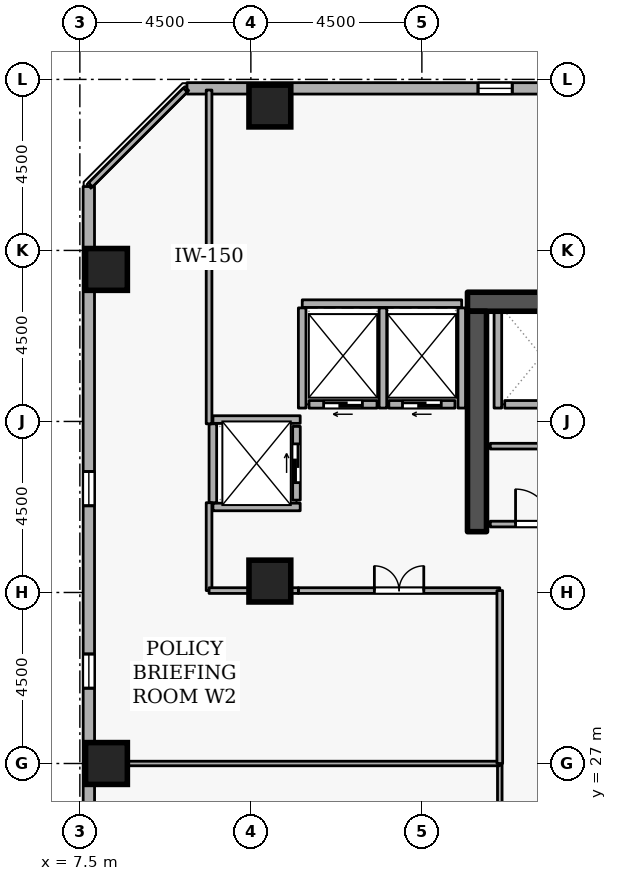
"""IFC4 building model, lengths in metres.
Left out: names, types, materials, properties, quantities, classifications, styles, units other than length and angle.
Written with IfcOpenShell. Run it as: python <this file> out.ifc"""

import sys

from ifc_helpers import new_model, si_unit, direction, frame, frame_2d, origin, origin_2d, place, context, subcontext, project, spatial, rectangle, extrude, element, fill, save


model = new_model("IFC4")
c1 = context("Model", 3, precision=1e-05, world=origin(), true_north=direction((0.0, 1.0)))
c2 = subcontext(c1, "Body", "Model", "MODEL_VIEW")
j1 = project(units=[si_unit("LENGTHUNIT", "METRE"), si_unit("PLANEANGLEUNIT", "RADIAN")], contexts=[c1])
p1 = place(None, origin())
s1 = spatial("IfcSite", under=j1, at=p1, CompositionType="ELEMENT")
p2 = place(p1, origin())
s2 = spatial("IfcBuilding", under=s1, at=p2, CompositionType="ELEMENT")
p3 = place(p2, frame((0.0, 0.0, 156.3)))
s3 = spatial("IfcBuildingStorey", under=s2, at=p3, CompositionType="ELEMENT", Elevation=156.3)
p4 = place(p3, frame((17.7, 39.15, 0.0), z_axis=(0.0, 0.0, 1.0), x_axis=(1.0, 0.0, 0.0)))
e1 = element("IfcWall", 1, at=p4, inside=s3, PredefinedType="SHEAR", context=c2, shape_type="SweptSolid", body=[
    extrude(rectangle(XDim=15.6, YDim=0.5, at=frame_2d((7.8, 0.0))), origin(), (0.0, 0.0, 1.0), 3.6),
])
p5 = place(p3, frame((17.95, 33.1, 0.0), z_axis=(0.0, 0.0, 1.0), x_axis=(0.0, 1.0, 0.0)))
e2 = element("IfcWall", 2, at=p5, inside=s3, PredefinedType="SHEAR", context=c2, shape_type="SweptSolid", body=[
    extrude(rectangle(XDim=5.8, YDim=0.5, at=frame_2d((2.9, 0.0))), origin(), (0.0, 0.0, 1.0), 3.6),
])
for number, where, z_axis, x_axis in (
    (3, (12.5, 44.3, 0.0), (0.0, 0.0, 1.0), (1.0, 0.0, 0.0)),
    (4, (8.2, 27.0, 0.0), (0.0, 0.0, 1.0), (1.0, 0.0, 0.0)),
    (5, (8.2, 40.0, 0.0), (0.0, 0.0, 1.0), (1.0, 0.0, 0.0)),
    (6, (12.5, 31.8, 0.0), (0.0, 0.0, 1.0), (1.0, 0.0, 0.0)),
):
    element("IfcColumn", number, at=place(p3, frame(where, z_axis=z_axis, x_axis=x_axis)), inside=s3, PredefinedType="COLUMN", context=c2, shape_type="SweptSolid", body=[
        extrude(rectangle(XDim=1.1, YDim=1.1, at=origin_2d()), origin(), (0.0, 0.0, 1.0), 3.6),
    ])
p6 = place(p3, frame((45.578, 44.761, 0.0), z_axis=(0.0, 0.0, 1.0), x_axis=(-0.999999994606, 0.000103863011, 0.0)))
e7 = element("IfcWall", 7, at=p6, inside=s3, PredefinedType="STANDARD", context=c2, shape_type="SweptSolid", body=[
    extrude(rectangle(XDim=35.259, YDim=0.3, at=frame_2d((17.629, 0.0))), origin(), (0.0, 0.0, 1.0), 2.7),
])
p7 = place(p6, frame((2.7, 0.0, 0.72)))
e8 = element("IfcOpeningElement", 8, at=p7, cuts=e7, PredefinedType="OPENING", context=c2, shape_type="SweptSolid", body=[
    extrude(rectangle(XDim=0.9, YDim=1.75, at=frame_2d((0.45, 0.875))), frame((0.0, 0.16, 0.0), z_axis=(0.0, -1.0, 0.0), x_axis=(1.0, 0.0, 0.0)), (0.0, 0.0, 1.0), 0.32),
])
p8 = place(p6, frame((12.3, 0.0, 0.72)))
e9 = element("IfcOpeningElement", 9, at=p8, cuts=e7, PredefinedType="OPENING", context=c2, shape_type="SweptSolid", body=[
    extrude(rectangle(XDim=0.9, YDim=1.75, at=frame_2d((0.45, 0.875))), frame((0.0, 0.16, 0.0), z_axis=(0.0, -1.0, 0.0), x_axis=(1.0, 0.0, 0.0)), (0.0, 0.0, 1.0), 0.32),
])
p9 = place(p6, frame((17.1, 0.0, 0.72)))
e10 = element("IfcOpeningElement", 10, at=p9, cuts=e7, PredefinedType="OPENING", context=c2, shape_type="SweptSolid", body=[
    extrude(rectangle(XDim=0.9, YDim=1.75, at=frame_2d((0.45, 0.875))), frame((0.0, 0.16, 0.0), z_axis=(0.0, -1.0, 0.0), x_axis=(1.0, 0.0, 0.0)), (0.0, 0.0, 1.0), 0.32),
])
p10 = place(p6, frame((21.9, 0.0, 0.72)))
e11 = element("IfcOpeningElement", 11, at=p10, cuts=e7, PredefinedType="OPENING", context=c2, shape_type="SweptSolid", body=[
    extrude(rectangle(XDim=0.9, YDim=1.75, at=frame_2d((0.45, 0.875))), frame((0.0, 0.16, 0.0), z_axis=(0.0, -1.0, 0.0), x_axis=(1.0, 0.0, 0.0)), (0.0, 0.0, 1.0), 0.32),
])
p11 = place(p6, frame((26.7, 0.0, 0.72)))
e12 = element("IfcOpeningElement", 12, at=p11, cuts=e7, PredefinedType="OPENING", context=c2, shape_type="SweptSolid", body=[
    extrude(rectangle(XDim=0.9, YDim=1.75, at=frame_2d((0.45, 0.875))), frame((0.0, 0.16, 0.0), z_axis=(0.0, -1.0, 0.0), x_axis=(1.0, 0.0, 0.0)), (0.0, 0.0, 1.0), 0.32),
])
p12 = place(p3, frame((7.735, 42.181, 0.0), z_axis=(0.0, 0.0, 1.0), x_axis=(0.000103863011, -0.999999994606, 0.0)))
e13 = element("IfcWall", 13, at=p12, inside=s3, PredefinedType="STANDARD", context=c2, shape_type="SweptSolid", body=[
    extrude(rectangle(XDim=35.259, YDim=0.3, at=frame_2d((17.629, 0.0))), origin(), (0.0, 0.0, 1.0), 2.7),
])
p13 = place(p12, frame((7.5, 0.0, 0.72)))
e14 = element("IfcOpeningElement", 14, at=p13, cuts=e13, PredefinedType="OPENING", context=c2, shape_type="SweptSolid", body=[
    extrude(rectangle(XDim=0.9, YDim=1.75, at=frame_2d((0.45, 0.875))), frame((0.0, 0.16, 0.0), z_axis=(0.0, -1.0, 0.0), x_axis=(1.0, 0.0, 0.0)), (0.0, 0.0, 1.0), 0.32),
])
p14 = place(p12, frame((12.3, 0.0, 0.72)))
e15 = element("IfcOpeningElement", 15, at=p14, cuts=e13, PredefinedType="OPENING", context=c2, shape_type="SweptSolid", body=[
    extrude(rectangle(XDim=0.9, YDim=1.75, at=frame_2d((0.45, 0.875))), frame((0.0, 0.16, 0.0), z_axis=(0.0, -1.0, 0.0), x_axis=(1.0, 0.0, 0.0)), (0.0, 0.0, 1.0), 0.32),
])
p15 = place(p12, frame((17.1, 0.0, 0.72)))
e16 = element("IfcOpeningElement", 16, at=p15, cuts=e13, PredefinedType="OPENING", context=c2, shape_type="SweptSolid", body=[
    extrude(rectangle(XDim=0.9, YDim=1.75, at=frame_2d((0.45, 0.875))), frame((0.0, 0.16, 0.0), z_axis=(0.0, -1.0, 0.0), x_axis=(1.0, 0.0, 0.0)), (0.0, 0.0, 1.0), 0.32),
])
p16 = place(p12, frame((21.9, 0.0, 0.72)))
e17 = element("IfcOpeningElement", 17, at=p16, cuts=e13, PredefinedType="OPENING", context=c2, shape_type="SweptSolid", body=[
    extrude(rectangle(XDim=0.9, YDim=1.75, at=frame_2d((0.45, 0.875))), frame((0.0, 0.16, 0.0), z_axis=(0.0, -1.0, 0.0), x_axis=(1.0, 0.0, 0.0)), (0.0, 0.0, 1.0), 0.32),
])
p17 = place(p12, frame((31.5, 0.0, 0.72)))
e18 = element("IfcOpeningElement", 18, at=p17, cuts=e13, PredefinedType="OPENING", context=c2, shape_type="SweptSolid", body=[
    extrude(rectangle(XDim=0.9, YDim=1.75, at=frame_2d((0.45, 0.875))), frame((0.0, 0.16, 0.0), z_axis=(0.0, -1.0, 0.0), x_axis=(1.0, 0.0, 0.0)), (0.0, 0.0, 1.0), 0.32),
])
p18 = place(p3, frame((20.62, 36.45, 0.0), z_axis=(0.0, 0.0, 1.0), x_axis=(-1.0, 0.0, 0.0)))
e19 = element("IfcWall", 19, at=p18, inside=s3, PredefinedType="STANDARD", context=c2, shape_type="SweptSolid", body=[
    extrude(rectangle(XDim=1.94, YDim=0.2, at=frame_2d((0.97, 0.0))), origin(), (0.0, 0.0, 1.0), 3.34),
])
p19 = place(p3, frame((17.37, 36.45, 0.0), z_axis=(0.0, 0.0, 1.0), x_axis=(-1.0, 0.0, 0.0)))
e20 = element("IfcWall", 20, at=p19, inside=s3, PredefinedType="STANDARD", context=c2, shape_type="SweptSolid", body=[
    extrude(rectangle(XDim=1.74, YDim=0.2, at=frame_2d((0.87, 0.0))), origin(), (0.0, 0.0, 1.0), 3.34),
])
p20 = place(p19, frame((0.36, 0.0, 0.0)))
e21 = element("IfcOpeningElement", 21, at=p20, cuts=e20, PredefinedType="OPENING", context=c2, shape_type="SweptSolid", body=[
    extrude(rectangle(XDim=1.02, YDim=2.06, at=frame_2d((0.51, 1.03))), frame((0.0, 0.11, 0.0), z_axis=(0.0, -1.0, 0.0), x_axis=(1.0, 0.0, 0.0)), (0.0, 0.0, 1.0), 0.22),
])
p21 = place(p3, frame((15.32, 36.45, 0.0), z_axis=(0.0, 0.0, 1.0), x_axis=(-1.0, 0.0, 0.0)))
e22 = element("IfcWall", 22, at=p21, inside=s3, PredefinedType="STANDARD", context=c2, shape_type="SweptSolid", body=[
    extrude(rectangle(XDim=1.79, YDim=0.2, at=frame_2d((0.895, 0.0))), origin(), (0.0, 0.0, 1.0), 3.34),
])
p22 = place(p21, frame((0.385, 0.0, 0.0)))
e23 = element("IfcOpeningElement", 23, at=p22, cuts=e22, PredefinedType="OPENING", context=c2, shape_type="SweptSolid", body=[
    extrude(rectangle(XDim=1.02, YDim=2.06, at=frame_2d((0.51, 1.03))), frame((0.0, 0.11, 0.0), z_axis=(0.0, -1.0, 0.0), x_axis=(1.0, 0.0, 0.0)), (0.0, 0.0, 1.0), 0.22),
])
p23 = place(p3, frame((13.2, 33.93, 0.0), z_axis=(0.0, 0.0, 1.0), x_axis=(0.0, 1.0, 0.0)))
e24 = element("IfcWall", 24, at=p23, inside=s3, PredefinedType="STANDARD", context=c2, shape_type="SweptSolid", body=[
    extrude(rectangle(XDim=1.94, YDim=0.2, at=frame_2d((0.97, 0.0))), origin(), (0.0, 0.0, 1.0), 3.34),
])
p24 = place(p23, frame((0.46, 0.0, 0.0)))
e25 = element("IfcOpeningElement", 25, at=p24, cuts=e24, PredefinedType="OPENING", context=c2, shape_type="SweptSolid", body=[
    extrude(rectangle(XDim=1.02, YDim=2.06, at=frame_2d((0.51, 1.03))), frame((0.0, 0.11, 0.0), z_axis=(0.0, -1.0, 0.0), x_axis=(1.0, 0.0, 0.0)), (0.0, 0.0, 1.0), 0.22),
])
p25 = place(p3, frame((18.5, 36.352, 0.0), z_axis=(0.0, 0.0, 1.0), x_axis=(0.0, 1.0, 0.0)))
e26 = element("IfcWall", 26, at=p25, inside=s3, PredefinedType="STANDARD", context=c2, shape_type="SweptSolid", body=[
    extrude(rectangle(XDim=2.536, YDim=0.2, at=frame_2d((1.268, 0.0))), origin(), (0.0, 0.0, 1.0), 3.34),
])
p26 = place(p3, frame((13.352, 39.1, 0.0), z_axis=(0.0, 0.0, 1.0), x_axis=(1.0, 0.0, 0.0)))
e27 = element("IfcWall", 27, at=p26, inside=s3, PredefinedType="STANDARD", context=c2, shape_type="SweptSolid", body=[
    extrude(rectangle(XDim=4.196, YDim=0.2, at=frame_2d((2.098, 0.0))), origin(), (0.0, 0.0, 1.0), 3.34),
])
p27 = place(p3, frame((17.55, 36.352, 0.0), z_axis=(0.0, 0.0, 1.0), x_axis=(0.0, 1.0, 0.0)))
e28 = element("IfcWall", 28, at=p27, inside=s3, PredefinedType="STANDARD", context=c2, shape_type="SweptSolid", body=[
    extrude(rectangle(XDim=2.636, YDim=0.2, at=frame_2d((1.318, 0.0))), origin(), (0.0, 0.0, 1.0), 2.545),
])
for number, where, z_axis, x_axis in (
    (29, (15.475, 36.352, 0.0), (0.0, 0.0, 1.0), (0.0, 1.0, 0.0)),
    (30, (13.35, 36.352, 0.0), (0.0, 0.0, 1.0), (0.0, 1.0, 0.0)),
):
    element("IfcWall", number, at=place(p3, frame(where, z_axis=z_axis, x_axis=x_axis)), inside=s3, PredefinedType="STANDARD", context=c2, shape_type="SweptSolid", body=[
        extrude(rectangle(XDim=2.636, YDim=0.2, at=frame_2d((1.318, 0.0))), origin(), (0.0, 0.0, 1.0), 3.34),
    ])
for number, where, z_axis, x_axis in (
    (31, (11.002, 36.05, 0.0), (0.0, 0.0, 1.0), (1.0, 0.0, 0.0)),
    (32, (11.002, 33.75, 0.0), (0.0, 0.0, 1.0), (1.0, 0.0, 0.0)),
):
    element("IfcWall", number, at=place(p3, frame(where, z_axis=z_axis, x_axis=x_axis)), inside=s3, PredefinedType="STANDARD", context=c2, shape_type="SweptSolid", body=[
        extrude(rectangle(XDim=2.296, YDim=0.2, at=frame_2d((1.148, 0.0))), origin(), (0.0, 0.0, 1.0), 3.34),
    ])
p28 = place(p3, frame((11.0, 33.862, 0.0), z_axis=(0.0, 0.0, 1.0), x_axis=(0.0, 1.0, 0.0)))
e33 = element("IfcWall", 33, at=p28, inside=s3, PredefinedType="STANDARD", context=c2, shape_type="SweptSolid", body=[
    extrude(rectangle(XDim=2.076, YDim=0.2, at=frame_2d((1.038, 0.0))), origin(), (0.0, 0.0, 1.0), 3.34),
])
p29 = place(p3, frame((18.3, 33.3, 0.0), z_axis=(0.0, 0.0, 1.0), x_axis=(1.0, 0.0, 0.0)))
e34 = element("IfcWall", 34, at=p29, inside=s3, PredefinedType="PARTITIONING", context=c2, shape_type="SweptSolid", body=[
    extrude(rectangle(XDim=2.25, YDim=0.15, at=frame_2d((1.125, 0.0))), origin(), (0.0, 0.0, 1.0), 3.34),
])
p30 = place(p29, frame((0.665, 0.0, 0.0)))
e35 = element("IfcOpeningElement", 35, at=p30, cuts=e34, PredefinedType="OPENING", context=c2, shape_type="SweptSolid", body=[
    extrude(rectangle(XDim=0.92, YDim=2.08, at=frame_2d((0.46, 1.04))), frame((0.0, 0.085, 0.0), z_axis=(0.0, -1.0, 0.0), x_axis=(1.0, 0.0, 0.0)), (0.0, 0.0, 1.0), 0.17),
])
p31 = place(p3, frame((20.55, 35.35, 0.0), z_axis=(0.0, 0.0, 1.0), x_axis=(-1.0, 0.0, 0.0)))
e36 = element("IfcWall", 36, at=p31, inside=s3, PredefinedType="PARTITIONING", context=c2, shape_type="SweptSolid", body=[
    extrude(rectangle(XDim=2.25, YDim=0.15, at=frame_2d((1.125, 0.0))), origin(), (0.0, 0.0, 1.0), 3.34),
])
p32 = place(p3, frame((18.55, 27.0, 0.0), z_axis=(0.0, 0.0, 1.0), x_axis=(0.0, -1.0, 0.0)))
e37 = element("IfcWall", 37, at=p32, inside=s3, PredefinedType="PARTITIONING", context=c2, shape_type="SweptSolid", body=[
    extrude(rectangle(XDim=4.55, YDim=0.12, at=frame_2d((2.275, 0.0))), origin(), (0.0, 0.0, 1.0), 3.34),
])
p33 = place(p3, frame((7.78, 27.0, 0.0), z_axis=(0.0, 0.0, 1.0), x_axis=(1.0, 0.0, 0.0)))
e38 = element("IfcWall", 38, at=p33, inside=s3, PredefinedType="PARTITIONING", context=c2, shape_type="SweptSolid", body=[
    extrude(rectangle(XDim=10.77, YDim=0.12, at=frame_2d((5.385, 0.0))), origin(), (0.0, 0.0, 1.0), 2.932),
])
p34 = place(p3, frame((13.25, 31.55, 0.0), z_axis=(0.0, 0.0, 1.0), x_axis=(1.0, 0.0, 0.0)))
e39 = element("IfcWall", 39, at=p34, inside=s3, PredefinedType="PARTITIONING", context=c2, shape_type="SweptSolid", body=[
    extrude(rectangle(XDim=5.3, YDim=0.15, at=frame_2d((2.65, 0.0))), origin(), (0.0, 0.0, 1.0), 3.34),
])
p35 = place(p34, frame((2.0, 0.0, 0.0)))
e40 = element("IfcOpeningElement", 40, at=p35, cuts=e39, PredefinedType="OPENING", context=c2, shape_type="SweptSolid", body=[
    extrude(rectangle(XDim=1.3, YDim=2.12, at=frame_2d((0.65, 1.06))), frame((0.0, 0.085, 0.0), z_axis=(0.0, -1.0, 0.0), x_axis=(1.0, 0.0, 0.0)), (0.0, 0.0, 1.0), 0.17),
])
p36 = place(p3, frame((18.55, 31.55, 0.0), z_axis=(0.0, 0.0, 1.0), x_axis=(0.0, -1.0, 0.0)))
e41 = element("IfcWall", 41, at=p36, inside=s3, PredefinedType="PARTITIONING", context=c2, shape_type="SweptSolid", body=[
    extrude(rectangle(XDim=4.55, YDim=0.15, at=frame_2d((2.275, 0.0))), origin(), (0.0, 0.0, 1.0), 3.34),
])
p37 = place(p3, frame((7.78, 42.225, 0.0), z_axis=(0.0, 0.0, 1.0), x_axis=(0.707106781187, 0.707106781187, 0.0)))
e42 = element("IfcWall", 42, at=p37, inside=s3, PredefinedType="PARTITIONING", context=c2, shape_type="SweptSolid", body=[
    extrude(rectangle(XDim=3.528, YDim=0.15, at=frame_2d((1.764, 0.0))), origin(), (0.0, 0.0, 1.0), 3.34),
])
p38 = place(p3, frame((10.9, 44.72, 0.0), z_axis=(0.0, 0.0, 1.0), x_axis=(0.0, -1.0, 0.0)))
e43 = element("IfcWall", 43, at=p38, inside=s3, PredefinedType="PARTITIONING", context=c2, shape_type="SweptSolid", body=[
    extrude(rectangle(XDim=8.782, YDim=0.15, at=frame_2d((4.391, 0.0))), origin(), (0.0, 0.0, 1.0), 3.34),
])
p39 = place(p3, frame((10.9, 33.862, 0.0), z_axis=(0.0, 0.0, 1.0), x_axis=(0.0, -1.0, 0.0)))
e44 = element("IfcWall", 44, at=p39, inside=s3, PredefinedType="PARTITIONING", context=c2, shape_type="SweptSolid", body=[
    extrude(rectangle(XDim=2.312, YDim=0.15, at=frame_2d((1.156, 0.0))), origin(), (0.0, 0.0, 1.0), 3.34),
])
p40 = place(p3, frame((10.9, 31.55, 0.0), z_axis=(0.0, 0.0, 1.0), x_axis=(1.0, 0.0, 0.0)))
e45 = element("IfcWall", 45, at=p40, inside=s3, PredefinedType="PARTITIONING", context=c2, shape_type="SweptSolid", body=[
    extrude(rectangle(XDim=2.35, YDim=0.15, at=frame_2d((1.175, 0.0))), origin(), (0.0, 0.0, 1.0), 3.34),
])
p41 = place(p11, origin())
e46 = element("IfcWindow", 46, at=p41, inside=s3, PartitioningType="SINGLE_PANEL", PredefinedType="WINDOW", context=c2, shape_type="SweptSolid", body=[
    extrude(rectangle(XDim=0.9, YDim=1.75, at=frame_2d((0.45, 0.875))), frame((0.0, 0.03, 0.0), z_axis=(0.0, -1.0, 0.0), x_axis=(1.0, 0.0, 0.0)), (0.0, 0.0, 1.0), 0.06),
])
fill(e12, e46)
p42 = place(p13, origin())
e47 = element("IfcWindow", 47, at=p42, inside=s3, PartitioningType="SINGLE_PANEL", PredefinedType="WINDOW", context=c2, shape_type="SweptSolid", body=[
    extrude(rectangle(XDim=0.9, YDim=1.75, at=frame_2d((0.45, 0.875))), frame((0.0, 0.03, 0.0), z_axis=(0.0, -1.0, 0.0), x_axis=(1.0, 0.0, 0.0)), (0.0, 0.0, 1.0), 0.06),
])
fill(e14, e47)
p43 = place(p14, origin())
e48 = element("IfcWindow", 48, at=p43, inside=s3, PartitioningType="SINGLE_PANEL", PredefinedType="WINDOW", context=c2, shape_type="SweptSolid", body=[
    extrude(rectangle(XDim=0.9, YDim=1.75, at=frame_2d((0.45, 0.875))), frame((0.0, 0.03, 0.0), z_axis=(0.0, -1.0, 0.0), x_axis=(1.0, 0.0, 0.0)), (0.0, 0.0, 1.0), 0.06),
])
fill(e15, e48)
p44 = place(p20, origin())
e49 = element("IfcDoor", 49, at=p44, inside=s3, OperationType="SLIDING_TO_LEFT", PredefinedType="DOOR", context=c2, shape_type="SweptSolid", body=[
    extrude(rectangle(XDim=1.02, YDim=2.06, at=frame_2d((0.51, 1.03))), frame((0.0, 0.025, 0.0), z_axis=(0.0, -1.0, 0.0), x_axis=(1.0, 0.0, 0.0)), (0.0, 0.0, 1.0), 0.05),
])
fill(e21, e49)
p45 = place(p22, origin())
e50 = element("IfcDoor", 50, at=p45, inside=s3, OperationType="SLIDING_TO_LEFT", PredefinedType="DOOR", context=c2, shape_type="SweptSolid", body=[
    extrude(rectangle(XDim=1.02, YDim=2.06, at=frame_2d((0.51, 1.03))), frame((0.0, 0.025, 0.0), z_axis=(0.0, -1.0, 0.0), x_axis=(1.0, 0.0, 0.0)), (0.0, 0.0, 1.0), 0.05),
])
fill(e23, e50)
p46 = place(p24, origin())
e51 = element("IfcDoor", 51, at=p46, inside=s3, OperationType="SLIDING_TO_LEFT", PredefinedType="DOOR", context=c2, shape_type="SweptSolid", body=[
    extrude(rectangle(XDim=1.02, YDim=2.06, at=frame_2d((0.51, 1.03))), frame((0.0, 0.025, 0.0), z_axis=(0.0, -1.0, 0.0), x_axis=(1.0, 0.0, 0.0)), (0.0, 0.0, 1.0), 0.05),
])
fill(e25, e51)
p47 = place(p30, origin())
e52 = element("IfcDoor", 52, at=p47, inside=s3, OperationType="SINGLE_SWING_LEFT", PredefinedType="DOOR", context=c2, shape_type="SweptSolid", body=[
    extrude(rectangle(XDim=0.92, YDim=2.08, at=frame_2d((0.46, 1.04))), frame((0.0, 0.025, 0.0), z_axis=(0.0, -1.0, 0.0), x_axis=(1.0, 0.0, 0.0)), (0.0, 0.0, 1.0), 0.05),
])
fill(e35, e52)
p48 = place(p35, origin())
e53 = element("IfcDoor", 53, at=p48, inside=s3, OperationType="DOUBLE_DOOR_SINGLE_SWING", PredefinedType="DOOR", context=c2, shape_type="SweptSolid", body=[
    extrude(rectangle(XDim=1.3, YDim=2.12, at=frame_2d((0.65, 1.06))), frame((0.0, 0.025, 0.0), z_axis=(0.0, -1.0, 0.0), x_axis=(1.0, 0.0, 0.0)), (0.0, 0.0, 1.0), 0.05),
])
fill(e40, e53)
save(model, sys.argv[1])
